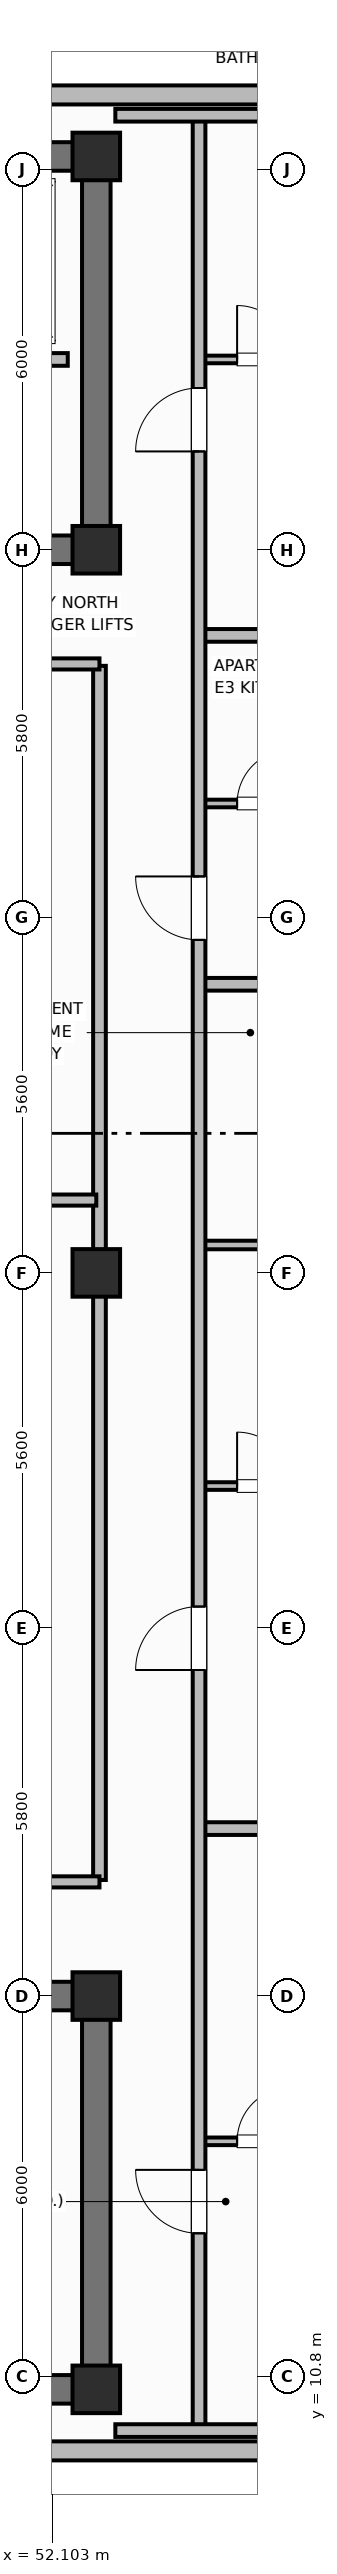
"""IFC4 building model, lengths in metres.
Left out: names, types, materials, properties, quantities, classifications, styles, units other than length and angle.
Written with IfcOpenShell. Run it as: python <this file> out.ifc"""

import sys

from ifc_helpers import new_model, si_unit, direction, frame, frame_2d, origin, origin_2d, place, context, subcontext, project, spatial, rectangle, extrude, element, fill, save


model = new_model("IFC4")
c1 = context("Model", 3, precision=1e-05, world=origin(), true_north=direction((0.0, 1.0)))
c2 = subcontext(c1, "Body", "Model", "MODEL_VIEW")
j1 = project(units=[si_unit("LENGTHUNIT", "METRE"), si_unit("PLANEANGLEUNIT", "RADIAN")], contexts=[c1])
p1 = place(None, origin())
s1 = spatial("IfcSite", under=j1, at=p1, CompositionType="ELEMENT")
p2 = place(p1, origin())
s2 = spatial("IfcBuilding", under=s1, at=p2, CompositionType="ELEMENT")
p3 = place(p2, frame((0.0, 0.0, 275.0)))
s3 = spatial("IfcBuildingStorey", under=s2, at=p3, CompositionType="ELEMENT", Elevation=275.0)
p4 = place(p3, frame((52.8, 10.6, 0.0), z_axis=(0.0, 0.0, 1.0), x_axis=(-1.0, 0.0, 0.0)))
e1 = element("IfcWall", 1, at=p4, inside=s3, PredefinedType="SHEAR", context=c2, shape_type="SweptSolid", body=[
    extrude(rectangle(XDim=27.2, YDim=0.45, at=frame_2d((13.6, 0.0))), origin(), (0.0, 0.0, 1.0), 3.7),
])
p5 = place(p3, frame((52.8, 10.825, 0.0), z_axis=(0.0, 0.0, 1.0), x_axis=(0.0, 1.0, 0.0)))
e2 = element("IfcWall", 2, at=p5, inside=s3, PredefinedType="SHEAR", context=c2, shape_type="SweptSolid", body=[
    extrude(rectangle(XDim=5.75, YDim=0.45, at=frame_2d((2.875, 0.0))), origin(), (0.0, 0.0, 1.0), 3.7),
])
p6 = place(p3, frame((25.6, 16.8, 0.0), z_axis=(0.0, 0.0, 1.0), x_axis=(1.0, 0.0, 0.0)))
e3 = element("IfcWall", 3, at=p6, inside=s3, PredefinedType="SHEAR", context=c2, shape_type="SweptSolid", body=[
    extrude(rectangle(XDim=27.2, YDim=0.45, at=frame_2d((13.6, 0.0))), origin(), (0.0, 0.0, 1.0), 3.7),
])
p7 = place(p6, frame((1.8, 0.0, 0.0)))
e4 = element("IfcOpeningElement", 4, at=p7, cuts=e3, PredefinedType="OPENING", context=c2, shape_type="SweptSolid", body=[
    extrude(rectangle(XDim=1.1, YDim=2.15, at=frame_2d((0.55, 1.075))), frame((0.0, 0.235, 0.0), z_axis=(0.0, -1.0, 0.0), x_axis=(1.0, 0.0, 0.0)), (0.0, 0.0, 1.0), 0.47),
])
p8 = place(p6, frame((5.6, 0.0, 0.0)))
e5 = element("IfcOpeningElement", 5, at=p8, cuts=e3, PredefinedType="OPENING", context=c2, shape_type="SweptSolid", body=[
    extrude(rectangle(XDim=0.85, YDim=2.1, at=frame_2d((0.425, 1.05))), frame((0.0, 0.235, 0.0), z_axis=(0.0, -1.0, 0.0), x_axis=(1.0, 0.0, 0.0)), (0.0, 0.0, 1.0), 0.47),
])
p9 = place(p6, frame((13.0, 0.0, 0.0)))
e6 = element("IfcOpeningElement", 6, at=p9, cuts=e3, PredefinedType="OPENING", context=c2, shape_type="SweptSolid", body=[
    extrude(rectangle(XDim=1.2, YDim=2.15, at=frame_2d((0.6, 1.075))), frame((0.0, 0.235, 0.0), z_axis=(0.0, -1.0, 0.0), x_axis=(1.0, 0.0, 0.0)), (0.0, 0.0, 1.0), 0.47),
])
p10 = place(p6, frame((19.2, 0.0, 0.0)))
e7 = element("IfcOpeningElement", 7, at=p10, cuts=e3, PredefinedType="OPENING", context=c2, shape_type="SweptSolid", body=[
    extrude(rectangle(XDim=0.85, YDim=2.1, at=frame_2d((0.425, 1.05))), frame((0.0, 0.235, 0.0), z_axis=(0.0, -1.0, 0.0), x_axis=(1.0, 0.0, 0.0)), (0.0, 0.0, 1.0), 0.47),
])
p11 = place(p6, frame((23.8, 0.0, 0.0)))
e8 = element("IfcOpeningElement", 8, at=p11, cuts=e3, PredefinedType="OPENING", context=c2, shape_type="SweptSolid", body=[
    extrude(rectangle(XDim=0.9, YDim=2.1, at=frame_2d((0.45, 1.05))), frame((0.0, 0.235, 0.0), z_axis=(0.0, -1.0, 0.0), x_axis=(1.0, 0.0, 0.0)), (0.0, 0.0, 1.0), 0.47),
])
p12 = place(p3, frame((25.6, 45.8, 0.0), z_axis=(0.0, 0.0, 1.0), x_axis=(1.0, 0.0, 0.0)))
e9 = element("IfcWall", 9, at=p12, inside=s3, PredefinedType="SHEAR", context=c2, shape_type="SweptSolid", body=[
    extrude(rectangle(XDim=27.2, YDim=0.45, at=frame_2d((13.6, 0.0))), origin(), (0.0, 0.0, 1.0), 3.7),
])
p13 = place(p3, frame((52.8, 39.825, 0.0), z_axis=(0.0, 0.0, 1.0), x_axis=(0.0, 1.0, 0.0)))
e10 = element("IfcWall", 10, at=p13, inside=s3, PredefinedType="SHEAR", context=c2, shape_type="SweptSolid", body=[
    extrude(rectangle(XDim=5.75, YDim=0.45, at=frame_2d((2.875, 0.0))), origin(), (0.0, 0.0, 1.0), 3.7),
])
p14 = place(p3, frame((52.8, 39.6, 0.0), z_axis=(0.0, 0.0, 1.0), x_axis=(-1.0, 0.0, 0.0)))
e11 = element("IfcWall", 11, at=p14, inside=s3, PredefinedType="SHEAR", context=c2, shape_type="SweptSolid", body=[
    extrude(rectangle(XDim=27.2, YDim=0.45, at=frame_2d((13.6, 0.0))), origin(), (0.0, 0.0, 1.0), 3.7),
])
p15 = place(p14, frame((24.2, 0.0, 0.0)))
e12 = element("IfcOpeningElement", 12, at=p15, cuts=e11, PredefinedType="OPENING", context=c2, shape_type="SweptSolid", body=[
    extrude(rectangle(XDim=1.1, YDim=2.15, at=frame_2d((0.55, 1.075))), frame((0.0, 0.235, 0.0), z_axis=(0.0, -1.0, 0.0), x_axis=(1.0, 0.0, 0.0)), (0.0, 0.0, 1.0), 0.47),
])
p16 = place(p14, frame((20.55, 0.0, 0.0)))
e13 = element("IfcOpeningElement", 13, at=p16, cuts=e11, PredefinedType="OPENING", context=c2, shape_type="SweptSolid", body=[
    extrude(rectangle(XDim=0.95, YDim=2.1, at=frame_2d((0.475, 1.05))), frame((0.0, 0.235, 0.0), z_axis=(0.0, -1.0, 0.0), x_axis=(1.0, 0.0, 0.0)), (0.0, 0.0, 1.0), 0.47),
])
p17 = place(p14, frame((15.1, 0.0, 0.0)))
e14 = element("IfcOpeningElement", 14, at=p17, cuts=e11, PredefinedType="OPENING", context=c2, shape_type="SweptSolid", body=[
    extrude(rectangle(XDim=1.2, YDim=2.15, at=frame_2d((0.6, 1.075))), frame((0.0, 0.235, 0.0), z_axis=(0.0, -1.0, 0.0), x_axis=(1.0, 0.0, 0.0)), (0.0, 0.0, 1.0), 0.47),
])
p18 = place(p14, frame((13.05, 0.0, 0.0)))
e15 = element("IfcOpeningElement", 15, at=p18, cuts=e11, PredefinedType="OPENING", context=c2, shape_type="SweptSolid", body=[
    extrude(rectangle(XDim=0.85, YDim=2.1, at=frame_2d((0.425, 1.05))), frame((0.0, 0.235, 0.0), z_axis=(0.0, -1.0, 0.0), x_axis=(1.0, 0.0, 0.0)), (0.0, 0.0, 1.0), 0.47),
])
p19 = place(p14, frame((11.0, 0.0, 0.0)))
e16 = element("IfcOpeningElement", 16, at=p19, cuts=e11, PredefinedType="OPENING", context=c2, shape_type="SweptSolid", body=[
    extrude(rectangle(XDim=0.85, YDim=2.1, at=frame_2d((0.425, 1.05))), frame((0.0, 0.235, 0.0), z_axis=(0.0, -1.0, 0.0), x_axis=(1.0, 0.0, 0.0)), (0.0, 0.0, 1.0), 0.47),
])
p20 = place(p14, frame((7.35, 0.0, 0.0)))
e17 = element("IfcOpeningElement", 17, at=p20, cuts=e11, PredefinedType="OPENING", context=c2, shape_type="SweptSolid", body=[
    extrude(rectangle(XDim=0.85, YDim=2.1, at=frame_2d((0.425, 1.05))), frame((0.0, 0.235, 0.0), z_axis=(0.0, -1.0, 0.0), x_axis=(1.0, 0.0, 0.0)), (0.0, 0.0, 1.0), 0.47),
])
p21 = place(p14, frame((4.2, 0.0, 0.0)))
e18 = element("IfcOpeningElement", 18, at=p21, cuts=e11, PredefinedType="OPENING", context=c2, shape_type="SweptSolid", body=[
    extrude(rectangle(XDim=1.3, YDim=2.2, at=frame_2d((0.65, 1.1))), frame((0.0, 0.235, 0.0), z_axis=(0.0, -1.0, 0.0), x_axis=(1.0, 0.0, 0.0)), (0.0, 0.0, 1.0), 0.47),
])
for number, where, z_axis, x_axis in (
    (19, (52.8, 10.6, 0.0), (0.0, 0.0, 1.0), (1.0, 0.0, 0.0)),
    (20, (52.8, 16.8, 0.0), (0.0, 0.0, 1.0), (1.0, 0.0, 0.0)),
    (21, (52.8, 39.6, 0.0), (0.0, 0.0, 1.0), (1.0, 0.0, 0.0)),
    (22, (52.8, 45.8, 0.0), (0.0, 0.0, 1.0), (1.0, 0.0, 0.0)),
    (23, (52.8, 28.2, 0.0), (0.0, 0.0, 1.0), (1.0, 0.0, 0.0)),
):
    element("IfcColumn", number, at=place(p3, frame(where, z_axis=z_axis, x_axis=x_axis)), inside=s3, PredefinedType="COLUMN", context=c2, shape_type="SweptSolid", body=[
        extrude(rectangle(XDim=0.75, YDim=0.75, at=origin_2d()), origin(), (0.0, 0.0, 1.0), 3.7),
    ])
p22 = place(p3, frame((30.61, 9.63, 0.0), z_axis=(0.0, 0.0, 1.0), x_axis=(1.0, 0.0, 0.0)))
e24 = element("IfcWall", 24, at=p22, inside=s3, PredefinedType="SOLIDWALL", context=c2, shape_type="SweptSolid", body=[
    extrude(rectangle(XDim=25.23, YDim=0.3, at=frame_2d((12.615, 0.0))), origin(), (0.0, 0.0, 1.0), 2.73),
])
p23 = place(p22, frame((0.894, 0.0, 0.71)))
e25 = element("IfcOpeningElement", 25, at=p23, cuts=e24, PredefinedType="OPENING", context=c2, shape_type="SweptSolid", body=[
    extrude(rectangle(XDim=2.1, YDim=1.9, at=frame_2d((1.05, 0.95))), frame((0.0, 0.16, 0.0), z_axis=(0.0, -1.0, 0.0), x_axis=(1.0, 0.0, 0.0)), (0.0, 0.0, 1.0), 0.32),
])
p24 = place(p22, frame((5.933, 0.0, 0.71)))
e26 = element("IfcOpeningElement", 26, at=p24, cuts=e24, PredefinedType="OPENING", context=c2, shape_type="SweptSolid", body=[
    extrude(rectangle(XDim=2.1, YDim=1.9, at=frame_2d((1.05, 0.95))), frame((0.0, 0.16, 0.0), z_axis=(0.0, -1.0, 0.0), x_axis=(1.0, 0.0, 0.0)), (0.0, 0.0, 1.0), 0.32),
])
p25 = place(p22, frame((9.221, 0.0, 0.71)))
e27 = element("IfcOpeningElement", 27, at=p25, cuts=e24, PredefinedType="OPENING", context=c2, shape_type="SweptSolid", body=[
    extrude(rectangle(XDim=2.1, YDim=1.9, at=frame_2d((1.05, 0.95))), frame((0.0, 0.16, 0.0), z_axis=(0.0, -1.0, 0.0), x_axis=(1.0, 0.0, 0.0)), (0.0, 0.0, 1.0), 0.32),
])
p26 = place(p22, frame((13.909, 0.0, 0.71)))
e28 = element("IfcOpeningElement", 28, at=p26, cuts=e24, PredefinedType="OPENING", context=c2, shape_type="SweptSolid", body=[
    extrude(rectangle(XDim=2.1, YDim=1.9, at=frame_2d((1.05, 0.95))), frame((0.0, 0.16, 0.0), z_axis=(0.0, -1.0, 0.0), x_axis=(1.0, 0.0, 0.0)), (0.0, 0.0, 1.0), 0.32),
])
p27 = place(p22, frame((17.548, 0.0, 0.71)))
e29 = element("IfcOpeningElement", 29, at=p27, cuts=e24, PredefinedType="OPENING", context=c2, shape_type="SweptSolid", body=[
    extrude(rectangle(XDim=2.1, YDim=1.9, at=frame_2d((1.05, 0.95))), frame((0.0, 0.16, 0.0), z_axis=(0.0, -1.0, 0.0), x_axis=(1.0, 0.0, 0.0)), (0.0, 0.0, 1.0), 0.32),
])
p28 = place(p3, frame((55.84, 46.77, 0.0), z_axis=(0.0, 0.0, 1.0), x_axis=(-1.0, 0.0, 0.0)))
e30 = element("IfcWall", 30, at=p28, inside=s3, PredefinedType="SOLIDWALL", context=c2, shape_type="SweptSolid", body=[
    extrude(rectangle(XDim=4.45, YDim=0.3, at=frame_2d((2.225, 0.0))), origin(), (0.0, 0.0, 1.0), 2.73),
])
p29 = place(p3, frame((52.35, 42.6, 0.0), z_axis=(0.0, 0.0, 1.0), x_axis=(-1.0, 0.0, 0.0)))
e31 = element("IfcWall", 31, at=p29, inside=s3, PredefinedType="PARTITIONING", context=c2, shape_type="SweptSolid", body=[
    extrude(rectangle(XDim=6.5, YDim=0.2, at=frame_2d((3.25, 0.0))), origin(), (0.0, 0.0, 1.0), 2.56),
])
p30 = place(p29, frame((4.9, 0.0, 0.0)))
e32 = element("IfcOpeningElement", 32, at=p30, cuts=e31, PredefinedType="OPENING", context=c2, shape_type="SweptSolid", body=[
    extrude(rectangle(XDim=1.0, YDim=2.15, at=frame_2d((0.5, 1.075))), frame((0.0, 0.11, 0.0), z_axis=(0.0, -1.0, 0.0), x_axis=(1.0, 0.0, 0.0)), (0.0, 0.0, 1.0), 0.22),
])
p31 = place(p29, frame((2.8, 0.0, 0.0)))
e33 = element("IfcOpeningElement", 33, at=p31, cuts=e31, PredefinedType="OPENING", context=c2, shape_type="SweptSolid", body=[
    extrude(rectangle(XDim=1.0, YDim=2.15, at=frame_2d((0.5, 1.075))), frame((0.0, 0.11, 0.0), z_axis=(0.0, -1.0, 0.0), x_axis=(1.0, 0.0, 0.0)), (0.0, 0.0, 1.0), 0.22),
])
p32 = place(p29, frame((0.7, 0.0, 0.0)))
e34 = element("IfcOpeningElement", 34, at=p32, cuts=e31, PredefinedType="OPENING", context=c2, shape_type="SweptSolid", body=[
    extrude(rectangle(XDim=1.0, YDim=2.15, at=frame_2d((0.5, 1.075))), frame((0.0, 0.11, 0.0), z_axis=(0.0, -1.0, 0.0), x_axis=(1.0, 0.0, 0.0)), (0.0, 0.0, 1.0), 0.22),
])
p33 = place(p3, frame((52.85, 18.63, 0.0), z_axis=(0.0, 0.0, 1.0), x_axis=(0.0, 1.0, 0.0)))
e35 = element("IfcWall", 35, at=p33, inside=s3, PredefinedType="PARTITIONING", context=c2, shape_type="SweptSolid", body=[
    extrude(rectangle(XDim=19.14, YDim=0.2, at=frame_2d((9.57, 0.0))), origin(), (0.0, 0.0, 1.0), 2.56),
])
for number, where, z_axis, x_axis in (
    (36, (30.7, 18.6, 0.0), (0.0, 0.0, 1.0), (1.0, 0.0, 0.0)),
    (37, (30.7, 37.8, 0.0), (0.0, 0.0, 1.0), (1.0, 0.0, 0.0)),
):
    element("IfcWall", number, at=place(p3, frame(where, z_axis=z_axis, x_axis=x_axis)), inside=s3, PredefinedType="PARTITIONING", context=c2, shape_type="SweptSolid", body=[
        extrude(rectangle(XDim=22.15, YDim=0.175, at=frame_2d((11.075, 0.0))), origin(), (0.0, 0.0, 1.0), 2.56),
    ])
p34 = place(p3, frame((30.73, 29.348, 0.0), z_axis=(0.0, 0.0, 1.0), x_axis=(1.0, 0.0, 0.0)))
e38 = element("IfcWall", 38, at=p34, inside=s3, PredefinedType="PARTITIONING", context=c2, shape_type="SweptSolid", body=[
    extrude(rectangle(XDim=22.07, YDim=0.175, at=frame_2d((11.035, 0.0))), origin(), (0.0, 0.0, 1.0), 2.56),
])
p35 = place(p3, frame((54.42, 14.51, 0.0), z_axis=(0.0, 0.0, 1.0), x_axis=(1.0, 0.0, 0.0)))
e39 = element("IfcWall", 39, at=p35, inside=s3, PredefinedType="PARTITIONING", context=c2, shape_type="SweptSolid", body=[
    extrude(rectangle(XDim=1.95, YDim=0.12, at=frame_2d((0.975, 0.0))), origin(), (0.0, 0.0, 1.0), 2.56),
])
p36 = place(p35, frame((0.6, 0.0, 0.0)))
e40 = element("IfcOpeningElement", 40, at=p36, cuts=e39, PredefinedType="OPENING", context=c2, shape_type="SweptSolid", body=[
    extrude(rectangle(XDim=0.85, YDim=2.1, at=frame_2d((0.425, 1.05))), frame((0.0, 0.07, 0.0), z_axis=(0.0, -1.0, 0.0), x_axis=(1.0, 0.0, 0.0)), (0.0, 0.0, 1.0), 0.14),
])
p37 = place(p3, frame((54.42, 19.44, 0.0), z_axis=(0.0, 0.0, 1.0), x_axis=(1.0, 0.0, 0.0)))
e41 = element("IfcWall", 41, at=p37, inside=s3, PredefinedType="PARTITIONING", context=c2, shape_type="SweptSolid", body=[
    extrude(rectangle(XDim=4.45, YDim=0.2, at=frame_2d((2.225, 0.0))), origin(), (0.0, 0.0, 1.0), 2.56),
])
p38 = place(p3, frame((54.42, 24.84, 0.0), z_axis=(0.0, 0.0, 1.0), x_axis=(1.0, 0.0, 0.0)))
e42 = element("IfcWall", 42, at=p38, inside=s3, PredefinedType="PARTITIONING", context=c2, shape_type="SweptSolid", body=[
    extrude(rectangle(XDim=1.95, YDim=0.12, at=frame_2d((0.975, 0.0))), origin(), (0.0, 0.0, 1.0), 2.56),
])
p39 = place(p38, frame((0.6, 0.0, 0.0)))
e43 = element("IfcOpeningElement", 43, at=p39, cuts=e42, PredefinedType="OPENING", context=c2, shape_type="SweptSolid", body=[
    extrude(rectangle(XDim=0.85, YDim=2.1, at=frame_2d((0.425, 1.05))), frame((0.0, 0.07, 0.0), z_axis=(0.0, -1.0, 0.0), x_axis=(1.0, 0.0, 0.0)), (0.0, 0.0, 1.0), 0.14),
])
p40 = place(p3, frame((54.42, 28.64, 0.0), z_axis=(0.0, 0.0, 1.0), x_axis=(1.0, 0.0, 0.0)))
e44 = element("IfcWall", 44, at=p40, inside=s3, PredefinedType="PARTITIONING", context=c2, shape_type="SweptSolid", body=[
    extrude(rectangle(XDim=1.95, YDim=0.135, at=frame_2d((0.975, 0.0))), origin(), (0.0, 0.0, 1.0), 2.56),
])
p41 = place(p3, frame((54.42, 32.75, 0.0), z_axis=(0.0, 0.0, 1.0), x_axis=(1.0, 0.0, 0.0)))
e45 = element("IfcWall", 45, at=p41, inside=s3, PredefinedType="PARTITIONING", context=c2, shape_type="SweptSolid", body=[
    extrude(rectangle(XDim=4.45, YDim=0.2, at=frame_2d((2.225, 0.0))), origin(), (0.0, 0.0, 1.0), 2.56),
])
p42 = place(p3, frame((54.42, 35.6, 0.0), z_axis=(0.0, 0.0, 1.0), x_axis=(1.0, 0.0, 0.0)))
e46 = element("IfcWall", 46, at=p42, inside=s3, PredefinedType="PARTITIONING", context=c2, shape_type="SweptSolid", body=[
    extrude(rectangle(XDim=1.95, YDim=0.12, at=frame_2d((0.975, 0.0))), origin(), (0.0, 0.0, 1.0), 2.56),
])
p43 = place(p42, frame((0.6, 0.0, 0.0)))
e47 = element("IfcOpeningElement", 47, at=p43, cuts=e46, PredefinedType="OPENING", context=c2, shape_type="SweptSolid", body=[
    extrude(rectangle(XDim=0.85, YDim=2.1, at=frame_2d((0.425, 1.05))), frame((0.0, 0.07, 0.0), z_axis=(0.0, -1.0, 0.0), x_axis=(1.0, 0.0, 0.0)), (0.0, 0.0, 1.0), 0.14),
])
p44 = place(p3, frame((54.42, 38.25, 0.0), z_axis=(0.0, 0.0, 1.0), x_axis=(1.0, 0.0, 0.0)))
e48 = element("IfcWall", 48, at=p44, inside=s3, PredefinedType="PARTITIONING", context=c2, shape_type="SweptSolid", body=[
    extrude(rectangle(XDim=4.45, YDim=0.2, at=frame_2d((2.225, 0.0))), origin(), (0.0, 0.0, 1.0), 2.56),
])
p45 = place(p3, frame((54.42, 42.6, 0.0), z_axis=(0.0, 0.0, 1.0), x_axis=(1.0, 0.0, 0.0)))
e49 = element("IfcWall", 49, at=p45, inside=s3, PredefinedType="PARTITIONING", context=c2, shape_type="SweptSolid", body=[
    extrude(rectangle(XDim=1.95, YDim=0.12, at=frame_2d((0.975, 0.0))), origin(), (0.0, 0.0, 1.0), 2.56),
])
p46 = place(p45, frame((0.6, 0.0, 0.0)))
e50 = element("IfcOpeningElement", 50, at=p46, cuts=e49, PredefinedType="OPENING", context=c2, shape_type="SweptSolid", body=[
    extrude(rectangle(XDim=0.85, YDim=2.1, at=frame_2d((0.425, 1.05))), frame((0.0, 0.07, 0.0), z_axis=(0.0, -1.0, 0.0), x_axis=(1.0, 0.0, 0.0)), (0.0, 0.0, 1.0), 0.14),
])
p47 = place(p3, frame((54.42, 9.95, 0.0), z_axis=(0.0, 0.0, 1.0), x_axis=(0.0, 1.0, 0.0)))
e51 = element("IfcWall", 51, at=p47, inside=s3, PredefinedType="PARTITIONING", context=c2, shape_type="SweptSolid", body=[
    extrude(rectangle(XDim=36.5, YDim=0.2, at=frame_2d((18.25, 0.0))), origin(), (0.0, 0.0, 1.0), 2.56),
])
p48 = place(p47, frame((3.11, 0.0, 0.0)))
e52 = element("IfcOpeningElement", 52, at=p48, cuts=e51, PredefinedType="OPENING", context=c2, shape_type="SweptSolid", body=[
    extrude(rectangle(XDim=1.0, YDim=2.15, at=frame_2d((0.5, 1.075))), frame((0.0, 0.11, 0.0), z_axis=(0.0, -1.0, 0.0), x_axis=(1.0, 0.0, 0.0)), (0.0, 0.0, 1.0), 0.22),
])
p49 = place(p47, frame((11.99, 0.0, 0.0)))
e53 = element("IfcOpeningElement", 53, at=p49, cuts=e51, PredefinedType="OPENING", context=c2, shape_type="SweptSolid", body=[
    extrude(rectangle(XDim=1.0, YDim=2.15, at=frame_2d((0.5, 1.075))), frame((0.0, 0.11, 0.0), z_axis=(0.0, -1.0, 0.0), x_axis=(1.0, 0.0, 0.0)), (0.0, 0.0, 1.0), 0.22),
])
p50 = place(p47, frame((23.5, 0.0, 0.0)))
e54 = element("IfcOpeningElement", 54, at=p50, cuts=e51, PredefinedType="OPENING", context=c2, shape_type="SweptSolid", body=[
    extrude(rectangle(XDim=1.0, YDim=2.15, at=frame_2d((0.5, 1.075))), frame((0.0, 0.11, 0.0), z_axis=(0.0, -1.0, 0.0), x_axis=(1.0, 0.0, 0.0)), (0.0, 0.0, 1.0), 0.22),
])
p51 = place(p47, frame((31.2, 0.0, 0.0)))
e55 = element("IfcOpeningElement", 55, at=p51, cuts=e51, PredefinedType="OPENING", context=c2, shape_type="SweptSolid", body=[
    extrude(rectangle(XDim=1.0, YDim=2.15, at=frame_2d((0.5, 1.075))), frame((0.0, 0.11, 0.0), z_axis=(0.0, -1.0, 0.0), x_axis=(1.0, 0.0, 0.0)), (0.0, 0.0, 1.0), 0.22),
])
for number, where, z_axis, x_axis in (
    (56, (53.1, 9.95, 0.0), (0.0, 0.0, 1.0), (1.0, 0.0, 0.0)),
    (57, (53.1, 46.45, 0.0), (0.0, 0.0, 1.0), (1.0, 0.0, 0.0)),
):
    element("IfcWall", number, at=place(p3, frame(where, z_axis=z_axis, x_axis=x_axis)), inside=s3, PredefinedType="PARTITIONING", context=c2, shape_type="SweptSolid", body=[
        extrude(rectangle(XDim=3.754, YDim=0.2, at=frame_2d((1.877, 0.0))), origin(), (0.0, 0.0, 1.0), 2.56),
    ])
p52 = place(p36, origin())
e58 = element("IfcDoor", 58, at=p52, inside=s3, OperationType="SINGLE_SWING_RIGHT", PredefinedType="DOOR", context=c2, shape_type="SweptSolid", body=[
    extrude(rectangle(XDim=0.85, YDim=2.1, at=frame_2d((0.425, 1.05))), frame((0.0, 0.025, 0.0), z_axis=(0.0, -1.0, 0.0), x_axis=(1.0, 0.0, 0.0)), (0.0, 0.0, 1.0), 0.05),
])
fill(e40, e58)
p53 = place(p39, origin())
e59 = element("IfcDoor", 59, at=p53, inside=s3, OperationType="SINGLE_SWING_LEFT", PredefinedType="DOOR", context=c2, shape_type="SweptSolid", body=[
    extrude(rectangle(XDim=0.85, YDim=2.1, at=frame_2d((0.425, 1.05))), frame((0.0, 0.025, 0.0), z_axis=(0.0, -1.0, 0.0), x_axis=(1.0, 0.0, 0.0)), (0.0, 0.0, 1.0), 0.05),
])
fill(e43, e59)
p54 = place(p43, origin())
e60 = element("IfcDoor", 60, at=p54, inside=s3, OperationType="SINGLE_SWING_RIGHT", PredefinedType="DOOR", context=c2, shape_type="SweptSolid", body=[
    extrude(rectangle(XDim=0.85, YDim=2.1, at=frame_2d((0.425, 1.05))), frame((0.0, 0.025, 0.0), z_axis=(0.0, -1.0, 0.0), x_axis=(1.0, 0.0, 0.0)), (0.0, 0.0, 1.0), 0.05),
])
fill(e47, e60)
p55 = place(p46, origin())
e61 = element("IfcDoor", 61, at=p55, inside=s3, OperationType="SINGLE_SWING_LEFT", PredefinedType="DOOR", context=c2, shape_type="SweptSolid", body=[
    extrude(rectangle(XDim=0.85, YDim=2.1, at=frame_2d((0.425, 1.05))), frame((0.0, 0.025, 0.0), z_axis=(0.0, -1.0, 0.0), x_axis=(1.0, 0.0, 0.0)), (0.0, 0.0, 1.0), 0.05),
])
fill(e50, e61)
p56 = place(p48, origin())
e62 = element("IfcDoor", 62, at=p56, inside=s3, OperationType="SINGLE_SWING_RIGHT", PredefinedType="DOOR", context=c2, shape_type="SweptSolid", body=[
    extrude(rectangle(XDim=1.0, YDim=2.15, at=frame_2d((0.5, 1.075))), frame((0.0, 0.025, 0.0), z_axis=(0.0, -1.0, 0.0), x_axis=(1.0, 0.0, 0.0)), (0.0, 0.0, 1.0), 0.05),
])
fill(e52, e62)
p57 = place(p49, origin())
e63 = element("IfcDoor", 63, at=p57, inside=s3, OperationType="SINGLE_SWING_LEFT", PredefinedType="DOOR", context=c2, shape_type="SweptSolid", body=[
    extrude(rectangle(XDim=1.0, YDim=2.15, at=frame_2d((0.5, 1.075))), frame((0.0, 0.025, 0.0), z_axis=(0.0, -1.0, 0.0), x_axis=(1.0, 0.0, 0.0)), (0.0, 0.0, 1.0), 0.05),
])
fill(e53, e63)
p58 = place(p50, origin())
e64 = element("IfcDoor", 64, at=p58, inside=s3, OperationType="SINGLE_SWING_RIGHT", PredefinedType="DOOR", context=c2, shape_type="SweptSolid", body=[
    extrude(rectangle(XDim=1.0, YDim=2.15, at=frame_2d((0.5, 1.075))), frame((0.0, 0.025, 0.0), z_axis=(0.0, -1.0, 0.0), x_axis=(1.0, 0.0, 0.0)), (0.0, 0.0, 1.0), 0.05),
])
fill(e54, e64)
p59 = place(p51, origin())
e65 = element("IfcDoor", 65, at=p59, inside=s3, OperationType="SINGLE_SWING_LEFT", PredefinedType="DOOR", context=c2, shape_type="SweptSolid", body=[
    extrude(rectangle(XDim=1.0, YDim=2.15, at=frame_2d((0.5, 1.075))), frame((0.0, 0.025, 0.0), z_axis=(0.0, -1.0, 0.0), x_axis=(1.0, 0.0, 0.0)), (0.0, 0.0, 1.0), 0.05),
])
fill(e55, e65)
save(model, sys.argv[1])
